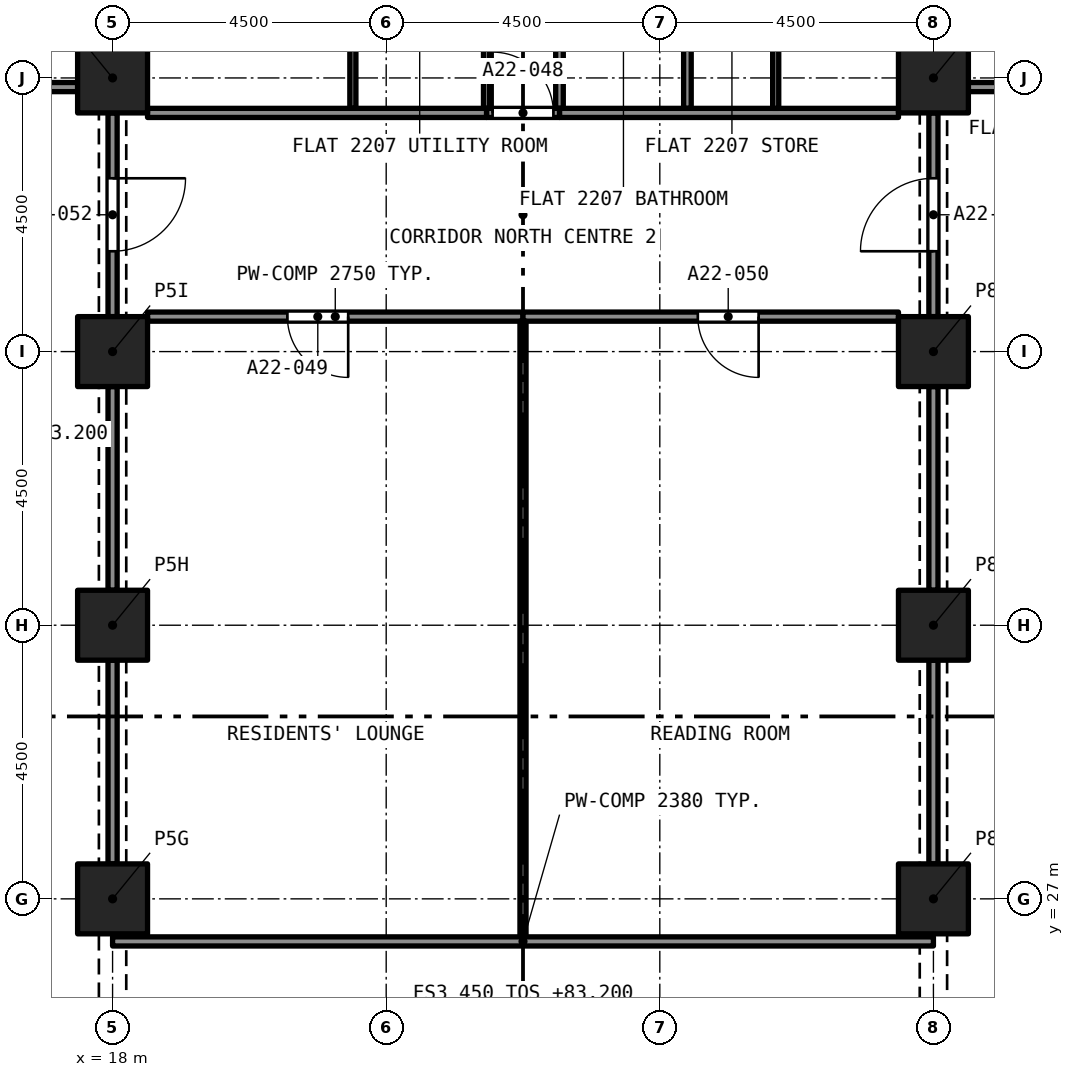
"""IFC4 building model, lengths in metres.
Left out: names, types, materials, properties, quantities, classifications, styles, units other than length and angle.
Written with IfcOpenShell. Run it as: python <this file> out.ifc"""

import sys

from ifc_helpers import new_model, si_unit, direction, frame, frame_2d, origin, origin_2d, place, context, subcontext, project, spatial, rectangle, extrude, element, fill, save


model = new_model("IFC4")
c1 = context("Model", 3, precision=1e-05, world=origin(), true_north=direction((0.0, 1.0)))
c2 = subcontext(c1, "Body", "Model", "MODEL_VIEW")
j1 = project(units=[si_unit("LENGTHUNIT", "METRE"), si_unit("PLANEANGLEUNIT", "RADIAN")], contexts=[c1])
p1 = place(None, origin())
s1 = spatial("IfcSite", under=j1, at=p1, CompositionType="ELEMENT")
p2 = place(p1, origin())
s2 = spatial("IfcBuilding", under=s1, at=p2, CompositionType="ELEMENT")
p3 = place(p2, frame((0.0, 0.0, 83.2)))
s3 = spatial("IfcBuildingStorey", under=s2, at=p3, CompositionType="ELEMENT", Elevation=83.2)
for number, where, z_axis, x_axis in (
    (1, (18.0, 27.0, 0.0), (0.0, 0.0, 1.0), (1.0, 0.0, 0.0)),
    (2, (31.5, 27.0, 0.0), (0.0, 0.0, 1.0), (1.0, 0.0, 0.0)),
    (3, (18.0, 31.5, 0.0), (0.0, 0.0, 1.0), (1.0, 0.0, 0.0)),
    (4, (31.5, 31.5, 0.0), (0.0, 0.0, 1.0), (1.0, 0.0, 0.0)),
    (5, (18.0, 36.0, 0.0), (0.0, 0.0, 1.0), (1.0, 0.0, 0.0)),
    (6, (31.5, 36.0, 0.0), (0.0, 0.0, 1.0), (1.0, 0.0, 0.0)),
    (7, (18.0, 40.5, 0.0), (0.0, 0.0, 1.0), (1.0, 0.0, 0.0)),
    (8, (31.5, 40.5, 0.0), (0.0, 0.0, 1.0), (1.0, 0.0, 0.0)),
):
    element("IfcColumn", number, at=place(p3, frame(where, z_axis=z_axis, x_axis=x_axis)), inside=s3, PredefinedType="COLUMN", context=c2, shape_type="SweptSolid", body=[
        extrude(rectangle(XDim=1.15, YDim=1.15, at=origin_2d()), origin(), (0.0, 0.0, 1.0), 3.2),
    ])
p4 = place(p3, frame((13.429, 40.35, 0.0), z_axis=(0.0, 0.0, 1.0), x_axis=(1.0, 0.0, 0.0)))
e9 = element("IfcWall", 9, at=p4, inside=s3, PredefinedType="PARTITIONING", context=c2, shape_type="SweptSolid", body=[
    extrude(rectangle(XDim=3.996, YDim=0.15, at=frame_2d((1.998, 0.0))), origin(), (0.0, 0.0, 1.0), 2.9),
])
p5 = place(p3, frame((32.075, 40.35, 0.0), z_axis=(0.0, 0.0, 1.0), x_axis=(1.0, 0.0, 0.0)))
e10 = element("IfcWall", 10, at=p5, inside=s3, PredefinedType="PARTITIONING", context=c2, shape_type="SweptSolid", body=[
    extrude(rectangle(XDim=2.275, YDim=0.15, at=frame_2d((1.138, 0.0))), origin(), (0.0, 0.0, 1.0), 2.9),
])
p6 = place(p5, frame((1.145, 0.0, 0.0)))
e11 = element("IfcOpeningElement", 11, at=p6, cuts=e10, PredefinedType="OPENING", context=c2, shape_type="SweptSolid", body=[
    extrude(rectangle(XDim=1.0, YDim=2.1, at=frame_2d((0.5, 1.05))), frame((0.0, 0.085, 0.0), z_axis=(0.0, -1.0, 0.0), x_axis=(1.0, 0.0, 0.0)), (0.0, 0.0, 1.0), 0.17),
])
for number, where, z_axis, x_axis in (
    (12, (25.35, 40.0, 0.0), (0.0, 0.0, 1.0), (0.0, 1.0, 0.0)),
    (13, (27.454, 40.0, 0.0), (0.0, 0.0, 1.0), (0.0, 1.0, 0.0)),
):
    element("IfcWall", number, at=place(p3, frame(where, z_axis=z_axis, x_axis=x_axis)), inside=s3, PredefinedType="PARTITIONING", context=c2, shape_type="SweptSolid", body=[
        extrude(rectangle(XDim=3.482, YDim=0.125, at=frame_2d((1.741, 0.0))), origin(), (0.0, 0.0, 1.0), 2.75),
    ])
p7 = place(p3, frame((25.35, 39.925, 0.0), z_axis=(0.0, 0.0, 1.0), x_axis=(1.0, 0.0, 0.0)))
e14 = element("IfcWall", 14, at=p7, inside=s3, PredefinedType="PARTITIONING", context=c2, shape_type="SweptSolid", body=[
    extrude(rectangle(XDim=5.575, YDim=0.15, at=frame_2d((2.788, 0.0))), origin(), (0.0, 0.0, 1.0), 2.75),
])
for number, where, z_axis, x_axis in (
    (15, (28.906, 40.0, 0.0), (0.0, 0.0, 1.0), (0.0, 1.0, 0.0)),
    (16, (24.15, 40.0, 0.0), (0.0, 0.0, 1.0), (0.0, 1.0, 0.0)),
):
    element("IfcWall", number, at=place(p3, frame(where, z_axis=z_axis, x_axis=x_axis)), inside=s3, PredefinedType="PARTITIONING", context=c2, shape_type="SweptSolid", body=[
        extrude(rectangle(XDim=3.495, YDim=0.1, at=frame_2d((1.748, 0.0))), origin(), (0.0, 0.0, 1.0), 2.75),
    ])
p8 = place(p3, frame((24.15, 39.925, 0.0), z_axis=(0.0, 0.0, 1.0), x_axis=(1.0, 0.0, 0.0)))
e17 = element("IfcWall", 17, at=p8, inside=s3, PredefinedType="PARTITIONING", context=c2, shape_type="SweptSolid", body=[
    extrude(rectangle(XDim=1.2, YDim=0.15, at=frame_2d((0.6, 0.0))), origin(), (0.0, 0.0, 1.0), 2.75),
])
p9 = place(p8, frame((0.1, 0.0, 0.0)))
e18 = element("IfcOpeningElement", 18, at=p9, cuts=e17, PredefinedType="OPENING", context=c2, shape_type="SweptSolid", body=[
    extrude(rectangle(XDim=1.0, YDim=2.1, at=frame_2d((0.5, 1.05))), frame((0.0, 0.085, 0.0), z_axis=(0.0, -1.0, 0.0), x_axis=(1.0, 0.0, 0.0)), (0.0, 0.0, 1.0), 0.17),
])
p10 = place(p3, frame((21.952, 40.0, 0.0), z_axis=(0.0, 0.0, 1.0), x_axis=(0.0, 1.0, 0.0)))
e19 = element("IfcWall", 19, at=p10, inside=s3, PredefinedType="PARTITIONING", context=c2, shape_type="SweptSolid", body=[
    extrude(rectangle(XDim=3.495, YDim=0.1, at=frame_2d((1.748, 0.0))), origin(), (0.0, 0.0, 1.0), 2.75),
])
p11 = place(p3, frame((18.575, 39.925, 0.0), z_axis=(0.0, 0.0, 1.0), x_axis=(1.0, 0.0, 0.0)))
e20 = element("IfcWall", 20, at=p11, inside=s3, PredefinedType="PARTITIONING", context=c2, shape_type="SweptSolid", body=[
    extrude(rectangle(XDim=5.575, YDim=0.15, at=frame_2d((2.788, 0.0))), origin(), (0.0, 0.0, 1.0), 2.75),
])
p12 = place(p3, frame((24.75, 36.575, 0.0), z_axis=(0.0, 0.0, 1.0), x_axis=(-1.0, 0.0, 0.0)))
e21 = element("IfcWall", 21, at=p12, inside=s3, PredefinedType="PARTITIONING", context=c2, shape_type="SweptSolid", body=[
    extrude(rectangle(XDim=6.175, YDim=0.15, at=frame_2d((3.087, 0.0))), origin(), (0.0, 0.0, 1.0), 2.75),
])
p13 = place(p12, frame((2.875, 0.0, 0.0)))
e22 = element("IfcOpeningElement", 22, at=p13, cuts=e21, PredefinedType="OPENING", context=c2, shape_type="SweptSolid", body=[
    extrude(rectangle(XDim=1.0, YDim=2.1, at=frame_2d((0.5, 1.05))), frame((0.0, 0.085, 0.0), z_axis=(0.0, -1.0, 0.0), x_axis=(1.0, 0.0, 0.0)), (0.0, 0.0, 1.0), 0.17),
])
p14 = place(p3, frame((30.925, 36.575, 0.0), z_axis=(0.0, 0.0, 1.0), x_axis=(-1.0, 0.0, 0.0)))
e23 = element("IfcWall", 23, at=p14, inside=s3, PredefinedType="PARTITIONING", context=c2, shape_type="SweptSolid", body=[
    extrude(rectangle(XDim=6.175, YDim=0.15, at=frame_2d((3.087, 0.0))), origin(), (0.0, 0.0, 1.0), 2.75),
])
p15 = place(p14, frame((2.3, 0.0, 0.0)))
e24 = element("IfcOpeningElement", 24, at=p15, cuts=e23, PredefinedType="OPENING", context=c2, shape_type="SweptSolid", body=[
    extrude(rectangle(XDim=1.0, YDim=2.1, at=frame_2d((0.5, 1.05))), frame((0.0, 0.085, 0.0), z_axis=(0.0, -1.0, 0.0), x_axis=(1.0, 0.0, 0.0)), (0.0, 0.0, 1.0), 0.17),
])
p16 = place(p3, frame((31.5, 36.575, 0.0), z_axis=(0.0, 0.0, 1.0), x_axis=(0.0, 1.0, 0.0)))
e25 = element("IfcWall", 25, at=p16, inside=s3, PredefinedType="PARTITIONING", context=c2, shape_type="SweptSolid", body=[
    extrude(rectangle(XDim=3.35, YDim=0.15, at=frame_2d((1.675, 0.0))), origin(), (0.0, 0.0, 1.0), 2.38),
])
p17 = place(p16, frame((1.075, 0.0, 0.0)))
e26 = element("IfcOpeningElement", 26, at=p17, cuts=e25, PredefinedType="OPENING", context=c2, shape_type="SweptSolid", body=[
    extrude(rectangle(XDim=1.2, YDim=2.1, at=frame_2d((0.6, 1.05))), frame((0.0, 0.085, 0.0), z_axis=(0.0, -1.0, 0.0), x_axis=(1.0, 0.0, 0.0)), (0.0, 0.0, 1.0), 0.17),
])
p18 = place(p3, frame((18.0, 39.925, 0.0), z_axis=(0.0, 0.0, 1.0), x_axis=(0.0, -1.0, 0.0)))
e27 = element("IfcWall", 27, at=p18, inside=s3, PredefinedType="PARTITIONING", context=c2, shape_type="SweptSolid", body=[
    extrude(rectangle(XDim=3.35, YDim=0.15, at=frame_2d((1.675, 0.0))), origin(), (0.0, 0.0, 1.0), 2.38),
])
p19 = place(p18, frame((1.075, 0.0, 0.0)))
e28 = element("IfcOpeningElement", 28, at=p19, cuts=e27, PredefinedType="OPENING", context=c2, shape_type="SweptSolid", body=[
    extrude(rectangle(XDim=1.2, YDim=2.1, at=frame_2d((0.6, 1.05))), frame((0.0, 0.085, 0.0), z_axis=(0.0, -1.0, 0.0), x_axis=(1.0, 0.0, 0.0)), (0.0, 0.0, 1.0), 0.17),
])
p20 = place(p3, frame((24.75, 26.375, 0.0), z_axis=(0.0, 0.0, 1.0), x_axis=(0.0, 1.0, 0.0)))
e29 = element("IfcWall", 29, at=p20, inside=s3, PredefinedType="PARTITIONING", context=c2, shape_type="SweptSolid", body=[
    extrude(rectangle(XDim=10.125, YDim=0.1, at=frame_2d((5.062, 0.0))), origin(), (0.0, 0.0, 1.0), 2.75),
])
for number, where, z_axis, x_axis in (
    (30, (18.0, 27.575, 0.0), (0.0, 0.0, 1.0), (0.0, 1.0, 0.0)),
    (31, (18.0, 32.075, 0.0), (0.0, 0.0, 1.0), (0.0, 1.0, 0.0)),
):
    element("IfcWall", number, at=place(p3, frame(where, z_axis=z_axis, x_axis=x_axis)), inside=s3, PredefinedType="PARTITIONING", context=c2, shape_type="SweptSolid", body=[
        extrude(rectangle(XDim=3.35, YDim=0.15, at=frame_2d((1.675, 0.0))), origin(), (0.0, 0.0, 1.0), 2.38),
    ])
p21 = place(p3, frame((18.0, 26.3, 0.0), z_axis=(0.0, 0.0, 1.0), x_axis=(1.0, 0.0, 0.0)))
e32 = element("IfcWall", 32, at=p21, inside=s3, PredefinedType="PARTITIONING", context=c2, shape_type="SweptSolid", body=[
    extrude(rectangle(XDim=13.5, YDim=0.15, at=frame_2d((6.75, 0.0))), origin(), (0.0, 0.0, 1.0), 2.38),
])
for number, where, z_axis, x_axis in (
    (33, (31.5, 32.075, 0.0), (0.0, 0.0, 1.0), (0.0, 1.0, 0.0)),
    (34, (31.5, 27.575, 0.0), (0.0, 0.0, 1.0), (0.0, 1.0, 0.0)),
):
    element("IfcWall", number, at=place(p3, frame(where, z_axis=z_axis, x_axis=x_axis)), inside=s3, PredefinedType="PARTITIONING", context=c2, shape_type="SweptSolid", body=[
        extrude(rectangle(XDim=3.35, YDim=0.15, at=frame_2d((1.675, 0.0))), origin(), (0.0, 0.0, 1.0), 2.38),
    ])
p22 = place(p9, origin())
e35 = element("IfcDoor", 35, at=p22, inside=s3, OperationType="SINGLE_SWING_RIGHT", PredefinedType="DOOR", context=c2, shape_type="SweptSolid", body=[
    extrude(rectangle(XDim=1.0, YDim=2.1, at=frame_2d((0.5, 1.05))), frame((0.0, 0.025, 0.0), z_axis=(0.0, -1.0, 0.0), x_axis=(1.0, 0.0, 0.0)), (0.0, 0.0, 1.0), 0.05),
])
fill(e18, e35)
p23 = place(p13, origin())
e36 = element("IfcDoor", 36, at=p23, inside=s3, OperationType="SINGLE_SWING_RIGHT", PredefinedType="DOOR", context=c2, shape_type="SweptSolid", body=[
    extrude(rectangle(XDim=1.0, YDim=2.1, at=frame_2d((0.5, 1.05))), frame((0.0, 0.025, 0.0), z_axis=(0.0, -1.0, 0.0), x_axis=(1.0, 0.0, 0.0)), (0.0, 0.0, 1.0), 0.05),
])
fill(e22, e36)
p24 = place(p15, origin())
e37 = element("IfcDoor", 37, at=p24, inside=s3, OperationType="SINGLE_SWING_LEFT", PredefinedType="DOOR", context=c2, shape_type="SweptSolid", body=[
    extrude(rectangle(XDim=1.0, YDim=2.1, at=frame_2d((0.5, 1.05))), frame((0.0, 0.025, 0.0), z_axis=(0.0, -1.0, 0.0), x_axis=(1.0, 0.0, 0.0)), (0.0, 0.0, 1.0), 0.05),
])
fill(e24, e37)
p25 = place(p17, origin())
e38 = element("IfcDoor", 38, at=p25, inside=s3, OperationType="SINGLE_SWING_LEFT", PredefinedType="DOOR", context=c2, shape_type="SweptSolid", body=[
    extrude(rectangle(XDim=1.2, YDim=2.1, at=frame_2d((0.6, 1.05))), frame((0.0, 0.025, 0.0), z_axis=(0.0, -1.0, 0.0), x_axis=(1.0, 0.0, 0.0)), (0.0, 0.0, 1.0), 0.05),
])
fill(e26, e38)
p26 = place(p19, origin())
e39 = element("IfcDoor", 39, at=p26, inside=s3, OperationType="SINGLE_SWING_LEFT", PredefinedType="DOOR", context=c2, shape_type="SweptSolid", body=[
    extrude(rectangle(XDim=1.2, YDim=2.1, at=frame_2d((0.6, 1.05))), frame((0.0, 0.025, 0.0), z_axis=(0.0, -1.0, 0.0), x_axis=(1.0, 0.0, 0.0)), (0.0, 0.0, 1.0), 0.05),
])
fill(e28, e39)
save(model, sys.argv[1])
